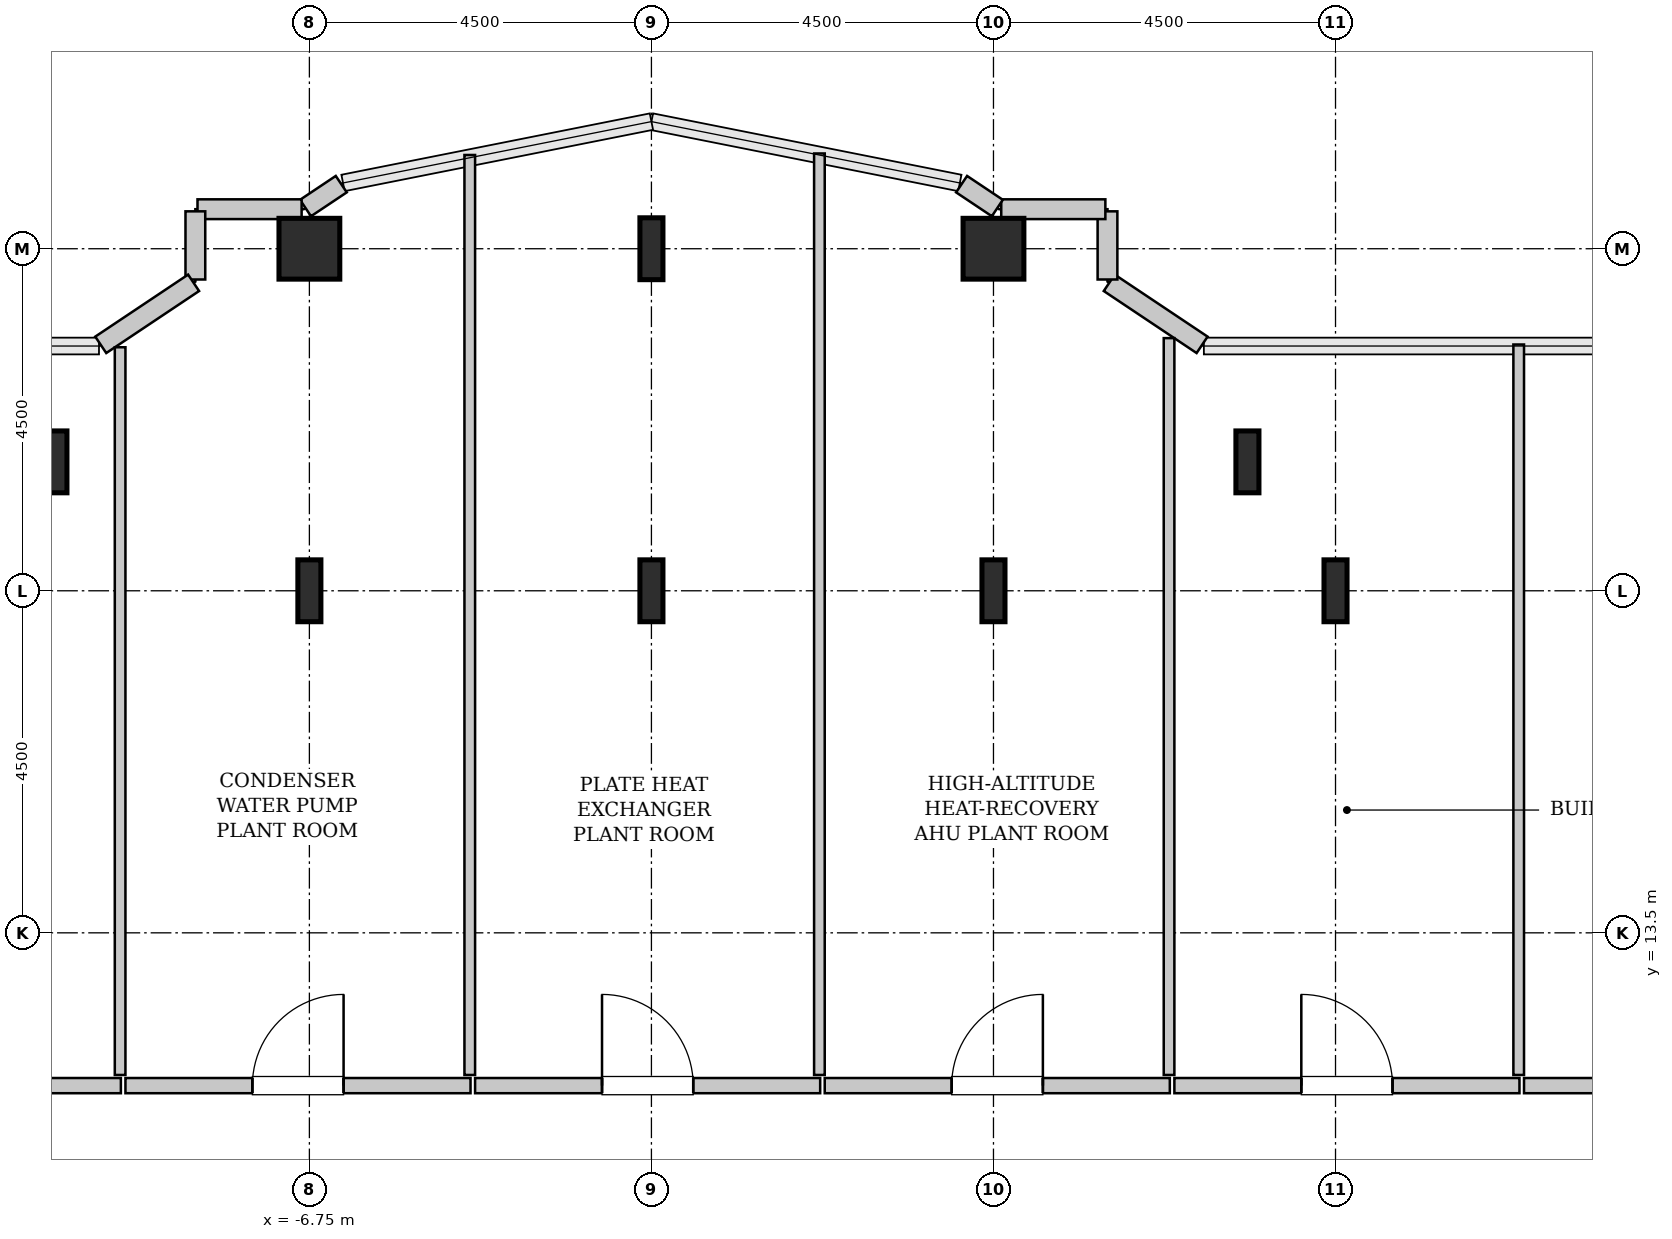
"""IFC4 building model, lengths in metres.
Left out: names, types, materials, properties, quantities, classifications, styles, units other than length and angle.
Written with IfcOpenShell. Run it as: python <this file> out.ifc"""

import sys

from ifc_helpers import new_model, si_unit, direction, frame, frame_2d, origin, origin_2d, place, context, subcontext, project, spatial, rectangle, hollow_rectangle, i_section, extrude, source, transform, mapped, element, fill, save


model = new_model("IFC4")
c1 = context("Model", 3, precision=1e-05, world=origin(), true_north=direction((0.0, 1.0)))
c2 = subcontext(c1, "Body", "Model", "MODEL_VIEW")
j1 = project(units=[si_unit("LENGTHUNIT", "METRE"), si_unit("PLANEANGLEUNIT", "RADIAN")], contexts=[c1])
p1 = place(None, origin())
s1 = spatial("IfcSite", under=j1, at=p1, CompositionType="ELEMENT")
p2 = place(p1, origin())
s2 = spatial("IfcBuilding", under=s1, at=p2, CompositionType="ELEMENT")
p3 = place(p2, frame((0.0, 0.0, 202.0)))
s3 = spatial("IfcBuildingStorey", under=s2, at=p3, CompositionType="ELEMENT", Elevation=202.0)
m1 = source(origin(), c2, "Body", "SweptSolid", [
    extrude(i_section(OverallWidth=0.303, OverallDepth=0.814, WebThickness=0.021, FlangeThickness=0.04, FilletRadius=0.03, at=origin_2d()), origin(), (0.0, 0.0, 1.0), 4.6),
])
for number, where, z_axis, x_axis in (
    (1, (-10.091, 19.696, 0.0), (0.0, 0.0, 1.0), (1.0, 0.0, 0.0)),
    (2, (-6.75, 18.0, 0.0), (0.0, 0.0, 1.0), (1.0, 0.0, 0.0)),
):
    element("IfcColumn", number, at=place(p3, frame(where, z_axis=z_axis, x_axis=x_axis)), inside=s3, PredefinedType="COLUMN", context=c2, shape_type="MappedRepresentation", body=[
        mapped(m1, transform((0.0, 0.0, 0.0), x_axis=(1.0, 0.0, 0.0), y_axis=(0.0, 1.0, 0.0), z_axis=(0.0, 0.0, 1.0), scale=1.0)),
    ])
m2 = source(origin(), c2, "Body", "SweptSolid", [
    extrude(hollow_rectangle(XDim=0.8, YDim=0.8, WallThickness=0.04, InnerFilletRadius=0.04, OuterFilletRadius=0.08, at=origin_2d()), origin(), (0.0, 0.0, 1.0), 4.6),
])
p4 = place(p3, frame((-6.75, 22.5, 0.0), z_axis=(0.0, 0.0, 1.0), x_axis=(1.0, 0.0, 0.0)))
e3 = element("IfcColumn", 3, at=p4, inside=s3, PredefinedType="COLUMN", context=c2, shape_type="MappedRepresentation", body=[
    mapped(m2, transform((0.0, 0.0, 0.0), x_axis=(1.0, 0.0, 0.0), y_axis=(0.0, 1.0, 0.0), z_axis=(0.0, 0.0, 1.0), scale=1.0)),
])
for number, where, z_axis, x_axis in (
    (4, (-2.25, 18.0, 0.0), (0.0, 0.0, 1.0), (1.0, 0.0, 0.0)),
    (5, (-2.25, 22.5, 0.0), (0.0, 0.0, 1.0), (1.0, 0.0, 0.0)),
    (6, (2.25, 18.0, 0.0), (0.0, 0.0, 1.0), (1.0, 0.0, 0.0)),
):
    element("IfcColumn", number, at=place(p3, frame(where, z_axis=z_axis, x_axis=x_axis)), inside=s3, PredefinedType="COLUMN", context=c2, shape_type="MappedRepresentation", body=[
        mapped(m1, transform((0.0, 0.0, 0.0), x_axis=(1.0, 0.0, 0.0), y_axis=(0.0, 1.0, 0.0), z_axis=(0.0, 0.0, 1.0), scale=1.0)),
    ])
p5 = place(p3, frame((2.25, 22.5, 0.0), z_axis=(0.0, 0.0, 1.0), x_axis=(1.0, 0.0, 0.0)))
e7 = element("IfcColumn", 7, at=p5, inside=s3, PredefinedType="COLUMN", context=c2, shape_type="MappedRepresentation", body=[
    mapped(m2, transform((0.0, 0.0, 0.0), x_axis=(1.0, 0.0, 0.0), y_axis=(0.0, 1.0, 0.0), z_axis=(0.0, 0.0, 1.0), scale=1.0)),
])
for number, where, z_axis, x_axis in (
    (8, (5.591, 19.696, 0.0), (0.0, 0.0, 1.0), (1.0, 0.0, 0.0)),
    (9, (6.75, 18.0, 0.0), (0.0, 0.0, 1.0), (1.0, 0.0, 0.0)),
):
    element("IfcColumn", number, at=place(p3, frame(where, z_axis=z_axis, x_axis=x_axis)), inside=s3, PredefinedType="COLUMN", context=c2, shape_type="MappedRepresentation", body=[
        mapped(m1, transform((0.0, 0.0, 0.0), x_axis=(1.0, 0.0, 0.0), y_axis=(0.0, 1.0, 0.0), z_axis=(0.0, 0.0, 1.0), scale=1.0)),
    ])
m3 = source(origin(), c2, "Body", "SweptSolid", [
    extrude(rectangle(XDim=1.469, YDim=0.26, at=frame_2d((0.734, 0.0))), origin(), (0.0, 0.0, 1.0), 4.35),
])
p6 = place(p3, frame((4.995, 21.236, 0.0), z_axis=(0.0, 0.0, 1.0), x_axis=(-0.831461760506, 0.555581983884, 0.0)))
e10 = element("IfcWall", 10, at=p6, inside=s3, PredefinedType="SOLIDWALL", context=c2, shape_type="MappedRepresentation", body=[
    mapped(m3, transform((0.0, 0.0, 0.0), x_axis=(1.0, 0.0, 0.0), y_axis=(0.0, 1.0, 0.0), z_axis=(0.0, 0.0, 1.0), scale=1.0)),
])
m4 = source(origin(), c2, "Body", "SweptSolid", [
    extrude(rectangle(XDim=0.897, YDim=0.26, at=frame_2d((0.448, 0.0))), origin(), (0.0, 0.0, 1.0), 4.35),
])
p7 = place(p3, frame((3.75, 22.095, 0.0), z_axis=(0.0, 0.0, 1.0), x_axis=(0.0, 1.0, 0.0)))
e11 = element("IfcWall", 11, at=p7, inside=s3, PredefinedType="SOLIDWALL", context=c2, shape_type="MappedRepresentation", body=[
    mapped(m4, transform((0.0, 0.0, 0.0), x_axis=(1.0, 0.0, 0.0), y_axis=(0.0, 1.0, 0.0), z_axis=(0.0, 0.0, 1.0), scale=1.0)),
])
m5 = source(origin(), c2, "Body", "SweptSolid", [
    extrude(rectangle(XDim=1.37, YDim=0.26, at=frame_2d((0.685, 0.0))), origin(), (0.0, 0.0, 1.0), 4.35),
])
p8 = place(p3, frame((3.722, 23.02, 0.0), z_axis=(0.0, 0.0, 1.0), x_axis=(-1.0, 0.0, 0.0)))
e12 = element("IfcWall", 12, at=p8, inside=s3, PredefinedType="SOLIDWALL", context=c2, shape_type="MappedRepresentation", body=[
    mapped(m5, transform((0.0, 0.0, 0.0), x_axis=(1.0, 0.0, 0.0), y_axis=(0.0, 1.0, 0.0), z_axis=(0.0, 0.0, 1.0), scale=1.0)),
])
m6 = source(origin(), c2, "Body", "SweptSolid", [
    extrude(rectangle(XDim=0.565, YDim=0.26, at=frame_2d((0.283, 0.0))), origin(), (0.0, 0.0, 1.0), 4.35),
])
for number, where, z_axis, x_axis in (
    (13, (2.301, 23.036, 0.0), (0.0, 0.0, 1.0), (-0.832, 0.555, 0.0)),
    (14, (-6.331, 23.35, 0.0), (0.0, 0.0, 1.0), (-0.832, -0.555, 0.0)),
):
    element("IfcWall", number, at=place(p3, frame(where, z_axis=z_axis, x_axis=x_axis)), inside=s3, PredefinedType="SOLIDWALL", context=c2, shape_type="MappedRepresentation", body=[
        mapped(m6, transform((0.0, 0.0, 0.0), x_axis=(1.0, 0.0, 0.0), y_axis=(0.0, 1.0, 0.0), z_axis=(0.0, 0.0, 1.0), scale=1.0)),
    ])
p9 = place(p3, frame((-6.852, 23.02, 0.0), z_axis=(0.0, 0.0, 1.0), x_axis=(-1.0, 0.0, 0.0)))
e15 = element("IfcWall", 15, at=p9, inside=s3, PredefinedType="SOLIDWALL", context=c2, shape_type="MappedRepresentation", body=[
    mapped(m5, transform((0.0, 0.0, 0.0), x_axis=(1.0, 0.0, 0.0), y_axis=(0.0, 1.0, 0.0), z_axis=(0.0, 0.0, 1.0), scale=1.0)),
])
p10 = place(p3, frame((-8.25, 22.992, 0.0), z_axis=(0.0, 0.0, 1.0), x_axis=(0.0, -1.0, 0.0)))
e16 = element("IfcWall", 16, at=p10, inside=s3, PredefinedType="SOLIDWALL", context=c2, shape_type="MappedRepresentation", body=[
    mapped(m4, transform((0.0, 0.0, 0.0), x_axis=(1.0, 0.0, 0.0), y_axis=(0.0, 1.0, 0.0), z_axis=(0.0, 0.0, 1.0), scale=1.0)),
])
p11 = place(p3, frame((-8.273, 22.052, 0.0), z_axis=(0.0, 0.0, 1.0), x_axis=(-0.831461760506, -0.555581983884, 0.0)))
e17 = element("IfcWall", 17, at=p11, inside=s3, PredefinedType="SOLIDWALL", context=c2, shape_type="MappedRepresentation", body=[
    mapped(m3, transform((0.0, 0.0, 0.0), x_axis=(1.0, 0.0, 0.0), y_axis=(0.0, 1.0, 0.0), z_axis=(0.0, 0.0, 1.0), scale=1.0)),
])
m7 = source(origin(), c2, "Body", "SweptSolid", [
    extrude(rectangle(XDim=24.85, YDim=0.2, at=frame_2d((12.425, 0.0))), origin(), (0.0, 0.0, 1.0), 4.335),
])
p12 = place(p3, frame((-34.08, 11.49, 0.0), z_axis=(0.0, 0.0, 1.0), x_axis=(1.0, 0.0, 0.0)))
e18 = element("IfcWall", 18, at=p12, inside=s3, PredefinedType="SOLIDWALL", context=c2, shape_type="MappedRepresentation", body=[
    mapped(m7, transform((0.0, 0.0, 0.0), x_axis=(1.0, 0.0, 0.0), y_axis=(0.0, 1.0, 0.0), z_axis=(0.0, 0.0, 1.0), scale=1.0)),
])
p13 = place(p12, frame((21.786, 0.0, 0.0)))
e19 = element("IfcOpeningElement", 19, at=p13, cuts=e18, PredefinedType="OPENING", context=c2, shape_type="SweptSolid", body=[
    extrude(rectangle(XDim=1.2, YDim=2.15, at=frame_2d((0.6, 1.075))), frame((0.0, 0.11, 0.0), z_axis=(0.0, -1.0, 0.0), x_axis=(1.0, 0.0, 0.0)), (0.0, 0.0, 1.0), 0.22),
])
m8 = source(origin(), c2, "Body", "SweptSolid", [
    extrude(rectangle(XDim=9.574, YDim=0.14, at=frame_2d((4.787, 0.0))), origin(), (0.0, 0.0, 1.0), 4.335),
])
p14 = place(p3, frame((-9.24, 11.63, 0.0), z_axis=(0.0, 0.0, 1.0), x_axis=(0.0, 1.0, 0.0)))
e20 = element("IfcWall", 20, at=p14, inside=s3, PredefinedType="PARTITIONING", context=c2, shape_type="MappedRepresentation", body=[
    mapped(m8, transform((0.0, 0.0, 0.0), x_axis=(1.0, 0.0, 0.0), y_axis=(0.0, 1.0, 0.0), z_axis=(0.0, 0.0, 1.0), scale=1.0)),
])
m9 = source(origin(), c2, "Body", "SweptSolid", [
    extrude(rectangle(XDim=4.54, YDim=0.2, at=frame_2d((2.27, 0.0))), origin(), (0.0, 0.0, 1.0), 4.335),
])
p15 = place(p3, frame((-9.17, 11.49, 0.0), z_axis=(0.0, 0.0, 1.0), x_axis=(1.0, 0.0, 0.0)))
e21 = element("IfcWall", 21, at=p15, inside=s3, PredefinedType="SOLIDWALL", context=c2, shape_type="MappedRepresentation", body=[
    mapped(m9, transform((0.0, 0.0, 0.0), x_axis=(1.0, 0.0, 0.0), y_axis=(0.0, 1.0, 0.0), z_axis=(0.0, 0.0, 1.0), scale=1.0)),
])
p16 = place(p15, frame((1.67, 0.0, 0.0)))
e22 = element("IfcOpeningElement", 22, at=p16, cuts=e21, PredefinedType="OPENING", context=c2, shape_type="SweptSolid", body=[
    extrude(rectangle(XDim=1.2, YDim=2.15, at=frame_2d((0.6, 1.075))), frame((0.0, 0.11, 0.0), z_axis=(0.0, -1.0, 0.0), x_axis=(1.0, 0.0, 0.0)), (0.0, 0.0, 1.0), 0.22),
])
m10 = source(origin(), c2, "Body", "SweptSolid", [
    extrude(rectangle(XDim=12.104, YDim=0.14, at=frame_2d((6.052, 0.0))), origin(), (0.0, 0.0, 1.0), 4.335),
])
p17 = place(p3, frame((-4.64, 11.63, 0.0), z_axis=(0.0, 0.0, 1.0), x_axis=(0.0, 1.0, 0.0)))
e23 = element("IfcWall", 23, at=p17, inside=s3, PredefinedType="PARTITIONING", context=c2, shape_type="MappedRepresentation", body=[
    mapped(m10, transform((0.0, 0.0, 0.0), x_axis=(1.0, 0.0, 0.0), y_axis=(0.0, 1.0, 0.0), z_axis=(0.0, 0.0, 1.0), scale=1.0)),
])
p18 = place(p3, frame((-4.57, 11.49, 0.0), z_axis=(0.0, 0.0, 1.0), x_axis=(1.0, 0.0, 0.0)))
e24 = element("IfcWall", 24, at=p18, inside=s3, PredefinedType="SOLIDWALL", context=c2, shape_type="MappedRepresentation", body=[
    mapped(m9, transform((0.0, 0.0, 0.0), x_axis=(1.0, 0.0, 0.0), y_axis=(0.0, 1.0, 0.0), z_axis=(0.0, 0.0, 1.0), scale=1.0)),
])
p19 = place(p18, frame((1.67, 0.0, 0.0)))
e25 = element("IfcOpeningElement", 25, at=p19, cuts=e24, PredefinedType="OPENING", context=c2, shape_type="SweptSolid", body=[
    extrude(rectangle(XDim=1.2, YDim=2.15, at=frame_2d((0.6, 1.075))), frame((0.0, 0.11, 0.0), z_axis=(0.0, -1.0, 0.0), x_axis=(1.0, 0.0, 0.0)), (0.0, 0.0, 1.0), 0.22),
])
m11 = source(origin(), c2, "Body", "SweptSolid", [
    extrude(rectangle(XDim=12.123, YDim=0.14, at=frame_2d((6.062, 0.0))), origin(), (0.0, 0.0, 1.0), 4.335),
])
p20 = place(p3, frame((-0.04, 11.63, 0.0), z_axis=(0.0, 0.0, 1.0), x_axis=(0.0, 1.0, 0.0)))
e26 = element("IfcWall", 26, at=p20, inside=s3, PredefinedType="PARTITIONING", context=c2, shape_type="MappedRepresentation", body=[
    mapped(m11, transform((0.0, 0.0, 0.0), x_axis=(1.0, 0.0, 0.0), y_axis=(0.0, 1.0, 0.0), z_axis=(0.0, 0.0, 1.0), scale=1.0)),
])
p21 = place(p3, frame((0.03, 11.49, 0.0), z_axis=(0.0, 0.0, 1.0), x_axis=(1.0, 0.0, 0.0)))
e27 = element("IfcWall", 27, at=p21, inside=s3, PredefinedType="SOLIDWALL", context=c2, shape_type="MappedRepresentation", body=[
    mapped(m9, transform((0.0, 0.0, 0.0), x_axis=(1.0, 0.0, 0.0), y_axis=(0.0, 1.0, 0.0), z_axis=(0.0, 0.0, 1.0), scale=1.0)),
])
p22 = place(p21, frame((1.67, 0.0, 0.0)))
e28 = element("IfcOpeningElement", 28, at=p22, cuts=e27, PredefinedType="OPENING", context=c2, shape_type="SweptSolid", body=[
    extrude(rectangle(XDim=1.2, YDim=2.15, at=frame_2d((0.6, 1.075))), frame((0.0, 0.11, 0.0), z_axis=(0.0, -1.0, 0.0), x_axis=(1.0, 0.0, 0.0)), (0.0, 0.0, 1.0), 0.22),
])
m12 = source(origin(), c2, "Body", "SweptSolid", [
    extrude(rectangle(XDim=9.694, YDim=0.14, at=frame_2d((4.847, 0.0))), origin(), (0.0, 0.0, 1.0), 4.335),
])
p23 = place(p3, frame((4.56, 11.63, 0.0), z_axis=(0.0, 0.0, 1.0), x_axis=(0.0, 1.0, 0.0)))
e29 = element("IfcWall", 29, at=p23, inside=s3, PredefinedType="PARTITIONING", context=c2, shape_type="MappedRepresentation", body=[
    mapped(m12, transform((0.0, 0.0, 0.0), x_axis=(1.0, 0.0, 0.0), y_axis=(0.0, 1.0, 0.0), z_axis=(0.0, 0.0, 1.0), scale=1.0)),
])
p24 = place(p3, frame((4.63, 11.49, 0.0), z_axis=(0.0, 0.0, 1.0), x_axis=(1.0, 0.0, 0.0)))
e30 = element("IfcWall", 30, at=p24, inside=s3, PredefinedType="SOLIDWALL", context=c2, shape_type="MappedRepresentation", body=[
    mapped(m9, transform((0.0, 0.0, 0.0), x_axis=(1.0, 0.0, 0.0), y_axis=(0.0, 1.0, 0.0), z_axis=(0.0, 0.0, 1.0), scale=1.0)),
])
p25 = place(p24, frame((1.67, 0.0, 0.0)))
e31 = element("IfcOpeningElement", 31, at=p25, cuts=e30, PredefinedType="OPENING", context=c2, shape_type="SweptSolid", body=[
    extrude(rectangle(XDim=1.2, YDim=2.15, at=frame_2d((0.6, 1.075))), frame((0.0, 0.11, 0.0), z_axis=(0.0, -1.0, 0.0), x_axis=(1.0, 0.0, 0.0)), (0.0, 0.0, 1.0), 0.22),
])
m13 = source(origin(), c2, "Body", "SweptSolid", [
    extrude(rectangle(XDim=9.61, YDim=0.14, at=frame_2d((4.805, 0.0))), origin(), (0.0, 0.0, 1.0), 4.335),
])
p26 = place(p3, frame((9.16, 11.63, 0.0), z_axis=(0.0, 0.0, 1.0), x_axis=(0.0, 1.0, 0.0)))
e32 = element("IfcWall", 32, at=p26, inside=s3, PredefinedType="PARTITIONING", context=c2, shape_type="MappedRepresentation", body=[
    mapped(m13, transform((0.0, 0.0, 0.0), x_axis=(1.0, 0.0, 0.0), y_axis=(0.0, 1.0, 0.0), z_axis=(0.0, 0.0, 1.0), scale=1.0)),
])
m14 = source(origin(), c2, "Body", "SweptSolid", [
    extrude(rectangle(XDim=15.85, YDim=0.2, at=frame_2d((7.925, 0.0))), origin(), (0.0, 0.0, 1.0), 4.335),
])
p27 = place(p3, frame((9.23, 11.49, 0.0), z_axis=(0.0, 0.0, 1.0), x_axis=(1.0, 0.0, 0.0)))
e33 = element("IfcWall", 33, at=p27, inside=s3, PredefinedType="SOLIDWALL", context=c2, shape_type="MappedRepresentation", body=[
    mapped(m14, transform((0.0, 0.0, 0.0), x_axis=(1.0, 0.0, 0.0), y_axis=(0.0, 1.0, 0.0), z_axis=(0.0, 0.0, 1.0), scale=1.0)),
])
p28 = place(p27, frame((1.864, 0.0, 0.0)))
e34 = element("IfcOpeningElement", 34, at=p28, cuts=e33, PredefinedType="OPENING", context=c2, shape_type="SweptSolid", body=[
    extrude(rectangle(XDim=1.2, YDim=2.15, at=frame_2d((0.6, 1.075))), frame((0.0, 0.11, 0.0), z_axis=(0.0, -1.0, 0.0), x_axis=(1.0, 0.0, 0.0)), (0.0, 0.0, 1.0), 0.22),
])
m15 = source(origin(), c2, "Body", "SweptSolid", [
    extrude(rectangle(XDim=1.2, YDim=2.15, at=frame_2d((0.6, 1.075))), frame((0.0, 0.025, 0.0), z_axis=(0.0, -1.0, 0.0), x_axis=(1.0, 0.0, 0.0)), (0.0, 0.0, 1.0), 0.05),
])
p29 = place(p16, origin())
e35 = element("IfcDoor", 35, at=p29, inside=s3, OperationType="SINGLE_SWING_RIGHT", PredefinedType="DOOR", context=c2, shape_type="MappedRepresentation", body=[
    mapped(m15, transform((0.0, 0.0, 0.0), x_axis=(1.0, 0.0, 0.0), y_axis=(0.0, 1.0, 0.0), z_axis=(0.0, 0.0, 1.0), scale=1.0)),
])
fill(e22, e35)
p30 = place(p19, origin())
e36 = element("IfcDoor", 36, at=p30, inside=s3, OperationType="SINGLE_SWING_LEFT", PredefinedType="DOOR", context=c2, shape_type="MappedRepresentation", body=[
    mapped(m15, transform((0.0, 0.0, 0.0), x_axis=(1.0, 0.0, 0.0), y_axis=(0.0, 1.0, 0.0), z_axis=(0.0, 0.0, 1.0), scale=1.0)),
])
fill(e25, e36)
p31 = place(p22, origin())
e37 = element("IfcDoor", 37, at=p31, inside=s3, OperationType="SINGLE_SWING_RIGHT", PredefinedType="DOOR", context=c2, shape_type="MappedRepresentation", body=[
    mapped(m15, transform((0.0, 0.0, 0.0), x_axis=(1.0, 0.0, 0.0), y_axis=(0.0, 1.0, 0.0), z_axis=(0.0, 0.0, 1.0), scale=1.0)),
])
fill(e28, e37)
p32 = place(p25, origin())
e38 = element("IfcDoor", 38, at=p32, inside=s3, OperationType="SINGLE_SWING_LEFT", PredefinedType="DOOR", context=c2, shape_type="MappedRepresentation", body=[
    mapped(m15, transform((0.0, 0.0, 0.0), x_axis=(1.0, 0.0, 0.0), y_axis=(0.0, 1.0, 0.0), z_axis=(0.0, 0.0, 1.0), scale=1.0)),
])
fill(e31, e38)
save(model, sys.argv[1])
